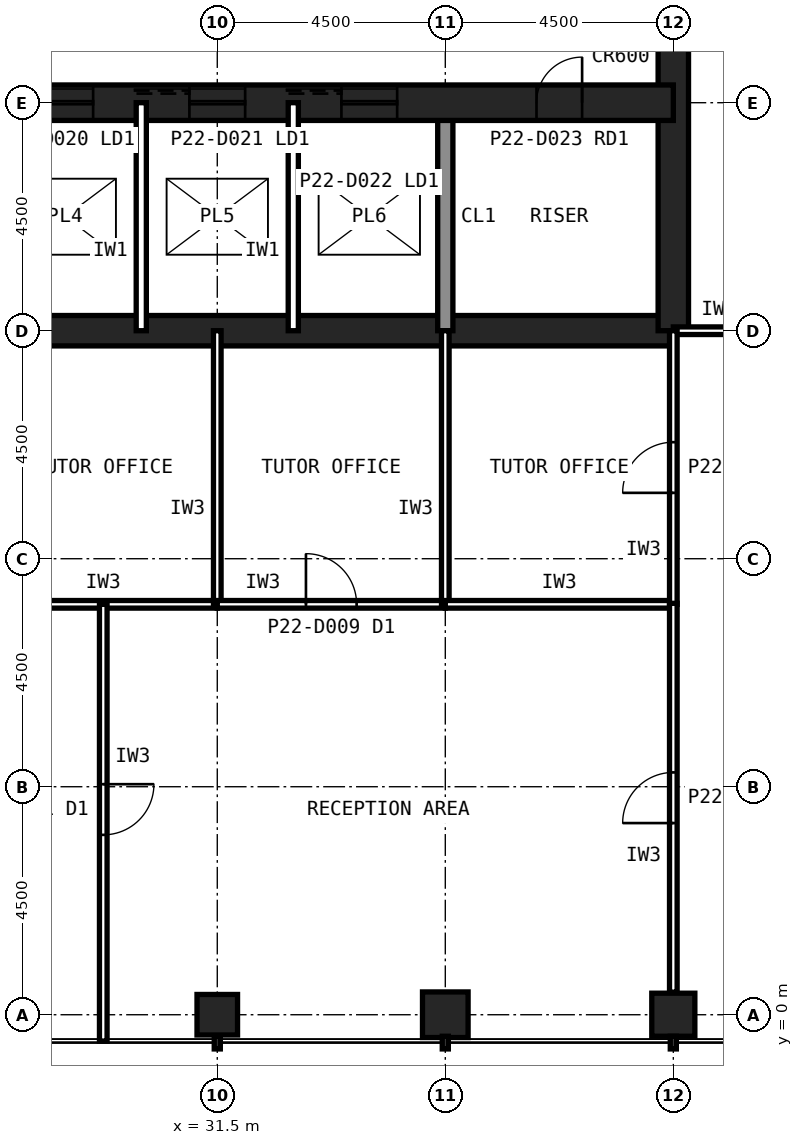
"""IFC4 building model, lengths in metres.
Left out: names, types, materials, properties, quantities, classifications, styles, units other than length and angle.
Written with IfcOpenShell. Run it as: python <this file> out.ifc"""

import sys

from ifc_helpers import new_model, si_unit, direction, frame, frame_2d, origin, origin_2d, place, context, subcontext, project, spatial, rectangle, hollow_rectangle, extrude, element, fill, save


model = new_model("IFC4")
c1 = context("Model", 3, precision=1e-05, world=origin(), true_north=direction((0.0, 1.0)))
c2 = subcontext(c1, "Body", "Model", "MODEL_VIEW")
j1 = project(units=[si_unit("LENGTHUNIT", "METRE"), si_unit("PLANEANGLEUNIT", "RADIAN")], contexts=[c1])
p1 = place(None, origin())
s1 = spatial("IfcSite", under=j1, at=p1, CompositionType="ELEMENT")
p2 = place(p1, origin())
s2 = spatial("IfcBuilding", under=s1, at=p2, CompositionType="ELEMENT")
p3 = place(p2, frame((0.0, 0.0, 96.2)))
s3 = spatial("IfcBuildingStorey", under=s2, at=p3, CompositionType="ELEMENT", Elevation=96.2)
p4 = place(p3, frame((31.5, 0.0, 0.0), z_axis=(0.0, 0.0, 1.0), x_axis=(1.0, 0.0, 0.0)))
e1 = element("IfcColumn", 1, at=p4, inside=s3, PredefinedType="COLUMN", context=c2, shape_type="SweptSolid", body=[
    extrude(hollow_rectangle(XDim=0.8, YDim=0.8, WallThickness=0.045, at=origin_2d()), origin(), (0.0, 0.0, 1.0), 4.2),
])
p5 = place(p3, frame((36.0, 0.0, 0.0), z_axis=(0.0, 0.0, 1.0), x_axis=(1.0, 0.0, 0.0)))
e2 = element("IfcColumn", 2, at=p5, inside=s3, PredefinedType="COLUMN", context=c2, shape_type="SweptSolid", body=[
    extrude(hollow_rectangle(XDim=0.9, YDim=0.9, WallThickness=0.063, at=origin_2d()), origin(), (0.0, 0.0, 1.0), 4.2),
])
p6 = place(p3, frame((40.5, 0.0, 0.0), z_axis=(0.0, 0.0, 1.0), x_axis=(1.0, 0.0, 0.0)))
e3 = element("IfcColumn", 3, at=p6, inside=s3, PredefinedType="COLUMN", context=c2, shape_type="SweptSolid", body=[
    extrude(hollow_rectangle(XDim=0.85, YDim=0.85, WallThickness=0.05, at=origin_2d()), origin(), (0.0, 0.0, 1.0), 4.2),
])
p7 = place(p3, frame((13.5, 13.5, 0.0), z_axis=(0.0, 0.0, 1.0), x_axis=(1.0, 0.0, 0.0)))
e4 = element("IfcWall", 4, at=p7, inside=s3, PredefinedType="SHEAR", context=c2, shape_type="SweptSolid", body=[
    extrude(rectangle(XDim=27.0, YDim=0.6, at=frame_2d((13.5, 0.0))), origin(), (0.0, 0.0, 1.0), 4.2),
])
p8 = place(p3, frame((40.5, 13.5, 0.0), z_axis=(0.0, 0.0, 1.0), x_axis=(0.0, 1.0, 0.0)))
e5 = element("IfcWall", 5, at=p8, inside=s3, PredefinedType="SHEAR", context=c2, shape_type="SweptSolid", body=[
    extrude(rectangle(XDim=27.0, YDim=0.6, at=frame_2d((13.5, 0.0))), origin(), (0.0, 0.0, 1.0), 4.2),
])
p9 = place(p8, frame((5.85, 0.0, 0.0)))
e6 = element("IfcOpeningElement", 6, at=p9, cuts=e5, PredefinedType="OPENING", context=c2, shape_type="SweptSolid", body=[
    extrude(rectangle(XDim=1.8, YDim=2.1, at=frame_2d((0.9, 1.05))), frame((0.0, 0.31, 0.0), z_axis=(0.0, -1.0, 0.0), x_axis=(1.0, 0.0, 0.0)), (0.0, 0.0, 1.0), 0.62),
])
p10 = place(p8, frame((19.65, 0.0, 0.0)))
e7 = element("IfcOpeningElement", 7, at=p10, cuts=e5, PredefinedType="OPENING", context=c2, shape_type="SweptSolid", body=[
    extrude(rectangle(XDim=1.2, YDim=2.1, at=frame_2d((0.6, 1.05))), frame((0.0, 0.31, 0.0), z_axis=(0.0, -1.0, 0.0), x_axis=(1.0, 0.0, 0.0)), (0.0, 0.0, 1.0), 0.62),
])
p11 = place(p3, frame((36.0, 13.5, 0.0), z_axis=(0.0, 0.0, 1.0), x_axis=(0.0, 1.0, 0.0)))
e8 = element("IfcWall", 8, at=p11, inside=s3, PredefinedType="SOLIDWALL", context=c2, shape_type="SweptSolid", body=[
    extrude(rectangle(XDim=4.5, YDim=0.3, at=frame_2d((2.25, 0.0))), origin(), (0.0, 0.0, 1.0), 4.04),
])
p12 = place(p3, frame((13.5, 18.0, 0.0), z_axis=(0.0, 0.0, 1.0), x_axis=(1.0, 0.0, 0.0)))
e9 = element("IfcWall", 9, at=p12, inside=s3, PredefinedType="SHEAR", context=c2, shape_type="SweptSolid", body=[
    extrude(rectangle(XDim=27.0, YDim=0.7, at=frame_2d((13.5, 0.0))), origin(), (0.0, 0.0, 1.0), 4.2),
])
p13 = place(p12, frame((24.3, 0.0, 0.0)))
e10 = element("IfcOpeningElement", 10, at=p13, cuts=e9, PredefinedType="OPENING", context=c2, shape_type="SweptSolid", body=[
    extrude(rectangle(XDim=0.9, YDim=2.1, at=frame_2d((0.45, 1.05))), frame((0.0, 0.36, 0.0), z_axis=(0.0, -1.0, 0.0), x_axis=(1.0, 0.0, 0.0)), (0.0, 0.0, 1.0), 0.72),
])
p14 = place(p12, frame((5.45, 0.0, 0.0)))
e11 = element("IfcOpeningElement", 11, at=p14, cuts=e9, PredefinedType="OPENING", context=c2, shape_type="SweptSolid", body=[
    extrude(rectangle(XDim=1.1, YDim=2.1, at=frame_2d((0.55, 1.05))), frame((0.0, 0.36, 0.0), z_axis=(0.0, -1.0, 0.0), x_axis=(1.0, 0.0, 0.0)), (0.0, 0.0, 1.0), 0.72),
])
p15 = place(p12, frame((8.45, 0.0, 0.0)))
e12 = element("IfcOpeningElement", 12, at=p15, cuts=e9, PredefinedType="OPENING", context=c2, shape_type="SweptSolid", body=[
    extrude(rectangle(XDim=1.1, YDim=2.1, at=frame_2d((0.55, 1.05))), frame((0.0, 0.36, 0.0), z_axis=(0.0, -1.0, 0.0), x_axis=(1.0, 0.0, 0.0)), (0.0, 0.0, 1.0), 0.72),
])
p16 = place(p12, frame((11.45, 0.0, 0.0)))
e13 = element("IfcOpeningElement", 13, at=p16, cuts=e9, PredefinedType="OPENING", context=c2, shape_type="SweptSolid", body=[
    extrude(rectangle(XDim=1.1, YDim=2.1, at=frame_2d((0.55, 1.05))), frame((0.0, 0.36, 0.0), z_axis=(0.0, -1.0, 0.0), x_axis=(1.0, 0.0, 0.0)), (0.0, 0.0, 1.0), 0.72),
])
p17 = place(p12, frame((14.45, 0.0, 0.0)))
e14 = element("IfcOpeningElement", 14, at=p17, cuts=e9, PredefinedType="OPENING", context=c2, shape_type="SweptSolid", body=[
    extrude(rectangle(XDim=1.1, YDim=2.1, at=frame_2d((0.55, 1.05))), frame((0.0, 0.36, 0.0), z_axis=(0.0, -1.0, 0.0), x_axis=(1.0, 0.0, 0.0)), (0.0, 0.0, 1.0), 0.72),
])
p18 = place(p12, frame((17.45, 0.0, 0.0)))
e15 = element("IfcOpeningElement", 15, at=p18, cuts=e9, PredefinedType="OPENING", context=c2, shape_type="SweptSolid", body=[
    extrude(rectangle(XDim=1.1, YDim=2.1, at=frame_2d((0.55, 1.05))), frame((0.0, 0.36, 0.0), z_axis=(0.0, -1.0, 0.0), x_axis=(1.0, 0.0, 0.0)), (0.0, 0.0, 1.0), 0.72),
])
p19 = place(p12, frame((20.45, 0.0, 0.0)))
e16 = element("IfcOpeningElement", 16, at=p19, cuts=e9, PredefinedType="OPENING", context=c2, shape_type="SweptSolid", body=[
    extrude(rectangle(XDim=1.1, YDim=2.1, at=frame_2d((0.55, 1.05))), frame((0.0, 0.36, 0.0), z_axis=(0.0, -1.0, 0.0), x_axis=(1.0, 0.0, 0.0)), (0.0, 0.0, 1.0), 0.72),
])
p20 = place(p12, frame((1.6, 0.0, 0.0)))
e17 = element("IfcOpeningElement", 17, at=p20, cuts=e9, PredefinedType="OPENING", context=c2, shape_type="SweptSolid", body=[
    extrude(rectangle(XDim=1.3, YDim=2.2, at=frame_2d((0.65, 1.1))), frame((0.0, 0.36, 0.0), z_axis=(0.0, -1.0, 0.0), x_axis=(1.0, 0.0, 0.0)), (0.0, 0.0, 1.0), 0.72),
])
for number, where, z_axis, x_axis in (
    (18, (30.0, 13.5, 0.0), (0.0, 0.0, 1.0), (0.0, 1.0, 0.0)),
    (19, (33.0, 13.5, 0.0), (0.0, 0.0, 1.0), (0.0, 1.0, 0.0)),
):
    element("IfcWall", number, at=place(p3, frame(where, z_axis=z_axis, x_axis=x_axis)), inside=s3, PredefinedType="PARTITIONING", context=c2, shape_type="SweptSolid", body=[
        extrude(rectangle(XDim=4.5, YDim=0.2, at=frame_2d((2.25, 0.0))), origin(), (0.0, 0.0, 1.0), 4.04),
    ])
p21 = place(p3, frame((40.5, 13.5, 0.0), z_axis=(0.0, 0.0, 1.0), x_axis=(1.0, 0.0, 0.0)))
e20 = element("IfcWall", 20, at=p21, inside=s3, PredefinedType="PARTITIONING", context=c2, shape_type="SweptSolid", body=[
    extrude(rectangle(XDim=1.8, YDim=0.15, at=frame_2d((0.9, 0.0))), origin(), (0.0, 0.0, 1.0), 3.189),
])
p22 = place(p3, frame((27.0, 8.1, 0.0), z_axis=(0.0, 0.0, 1.0), x_axis=(1.0, 0.0, 0.0)))
e21 = element("IfcWall", 21, at=p22, inside=s3, PredefinedType="PARTITIONING", context=c2, shape_type="SweptSolid", body=[
    extrude(rectangle(XDim=4.5, YDim=0.15, at=frame_2d((2.25, 0.0))), origin(), (0.0, 0.0, 1.0), 4.04),
])
p23 = place(p3, frame((31.5, 8.1, 0.0), z_axis=(0.0, 0.0, 1.0), x_axis=(0.0, 1.0, 0.0)))
e22 = element("IfcWall", 22, at=p23, inside=s3, PredefinedType="PARTITIONING", context=c2, shape_type="SweptSolid", body=[
    extrude(rectangle(XDim=5.4, YDim=0.15, at=frame_2d((2.7, 0.0))), origin(), (0.0, 0.0, 1.0), 3.189),
])
p24 = place(p3, frame((31.5, 8.1, 0.0), z_axis=(0.0, 0.0, 1.0), x_axis=(1.0, 0.0, 0.0)))
e23 = element("IfcWall", 23, at=p24, inside=s3, PredefinedType="PARTITIONING", context=c2, shape_type="SweptSolid", body=[
    extrude(rectangle(XDim=4.5, YDim=0.15, at=frame_2d((2.25, 0.0))), origin(), (0.0, 0.0, 1.0), 4.04),
])
p25 = place(p24, frame((1.75, 0.0, 0.0)))
e24 = element("IfcOpeningElement", 24, at=p25, cuts=e23, PredefinedType="OPENING", context=c2, shape_type="SweptSolid", body=[
    extrude(rectangle(XDim=1.0, YDim=2.1, at=frame_2d((0.5, 1.05))), frame((0.0, 0.085, 0.0), z_axis=(0.0, -1.0, 0.0), x_axis=(1.0, 0.0, 0.0)), (0.0, 0.0, 1.0), 0.17),
])
p26 = place(p3, frame((36.0, 8.1, 0.0), z_axis=(0.0, 0.0, 1.0), x_axis=(0.0, 1.0, 0.0)))
e25 = element("IfcWall", 25, at=p26, inside=s3, PredefinedType="PARTITIONING", context=c2, shape_type="SweptSolid", body=[
    extrude(rectangle(XDim=5.4, YDim=0.15, at=frame_2d((2.7, 0.0))), origin(), (0.0, 0.0, 1.0), 3.189),
])
p27 = place(p3, frame((36.0, 8.1, 0.0), z_axis=(0.0, 0.0, 1.0), x_axis=(1.0, 0.0, 0.0)))
e26 = element("IfcWall", 26, at=p27, inside=s3, PredefinedType="PARTITIONING", context=c2, shape_type="SweptSolid", body=[
    extrude(rectangle(XDim=4.5, YDim=0.15, at=frame_2d((2.25, 0.0))), origin(), (0.0, 0.0, 1.0), 4.04),
])
p28 = place(p3, frame((40.5, 8.1, 0.0), z_axis=(0.0, 0.0, 1.0), x_axis=(0.0, 1.0, 0.0)))
e27 = element("IfcWall", 27, at=p28, inside=s3, PredefinedType="PARTITIONING", context=c2, shape_type="SweptSolid", body=[
    extrude(rectangle(XDim=5.4, YDim=0.15, at=frame_2d((2.7, 0.0))), origin(), (0.0, 0.0, 1.0), 3.189),
])
p29 = place(p28, frame((2.2, 0.0, 0.0)))
e28 = element("IfcOpeningElement", 28, at=p29, cuts=e27, PredefinedType="OPENING", context=c2, shape_type="SweptSolid", body=[
    extrude(rectangle(XDim=1.0, YDim=2.1, at=frame_2d((0.5, 1.05))), frame((0.0, 0.085, 0.0), z_axis=(0.0, -1.0, 0.0), x_axis=(1.0, 0.0, 0.0)), (0.0, 0.0, 1.0), 0.17),
])
p30 = place(p3, frame((29.25, 8.1, 0.0), z_axis=(0.0, 0.0, 1.0), x_axis=(0.0, -1.0, 0.0)))
e29 = element("IfcWall", 29, at=p30, inside=s3, PredefinedType="PARTITIONING", context=c2, shape_type="SweptSolid", body=[
    extrude(rectangle(XDim=8.62, YDim=0.15, at=frame_2d((4.31, 0.0))), origin(), (0.0, 0.0, 1.0), 4.04),
])
p31 = place(p30, frame((3.55, 0.0, 0.0)))
e30 = element("IfcOpeningElement", 30, at=p31, cuts=e29, PredefinedType="OPENING", context=c2, shape_type="SweptSolid", body=[
    extrude(rectangle(XDim=1.0, YDim=2.1, at=frame_2d((0.5, 1.05))), frame((0.0, 0.085, 0.0), z_axis=(0.0, -1.0, 0.0), x_axis=(1.0, 0.0, 0.0)), (0.0, 0.0, 1.0), 0.17),
])
p32 = place(p3, frame((40.5, 0.445, 0.0), z_axis=(0.0, 0.0, 1.0), x_axis=(0.0, 1.0, 0.0)))
e31 = element("IfcWall", 31, at=p32, inside=s3, PredefinedType="PARTITIONING", context=c2, shape_type="SweptSolid", body=[
    extrude(rectangle(XDim=7.675, YDim=0.15, at=frame_2d((3.837, 0.0))), origin(), (0.0, 0.0, 1.0), 3.189),
])
p33 = place(p32, frame((3.337, 0.0, 0.0)))
e32 = element("IfcOpeningElement", 32, at=p33, cuts=e31, PredefinedType="OPENING", context=c2, shape_type="SweptSolid", body=[
    extrude(rectangle(XDim=1.0, YDim=2.1, at=frame_2d((0.5, 1.05))), frame((0.0, 0.085, 0.0), z_axis=(0.0, -1.0, 0.0), x_axis=(1.0, 0.0, 0.0)), (0.0, 0.0, 1.0), 0.17),
])
p34 = place(p13, origin())
e33 = element("IfcDoor", 33, at=p34, inside=s3, OperationType="SINGLE_SWING_RIGHT", PredefinedType="DOOR", context=c2, shape_type="SweptSolid", body=[
    extrude(rectangle(XDim=0.9, YDim=2.1, at=frame_2d((0.45, 1.05))), frame((0.0, 0.025, 0.0), z_axis=(0.0, -1.0, 0.0), x_axis=(1.0, 0.0, 0.0)), (0.0, 0.0, 1.0), 0.05),
])
fill(e10, e33)
p35 = place(p17, origin())
e34 = element("IfcDoor", 34, at=p35, inside=s3, OperationType="SLIDING_TO_LEFT", PredefinedType="DOOR", context=c2, shape_type="SweptSolid", body=[
    extrude(rectangle(XDim=1.1, YDim=2.1, at=frame_2d((0.55, 1.05))), frame((0.0, 0.025, 0.0), z_axis=(0.0, -1.0, 0.0), x_axis=(1.0, 0.0, 0.0)), (0.0, 0.0, 1.0), 0.05),
])
fill(e14, e34)
p36 = place(p18, origin())
e35 = element("IfcDoor", 35, at=p36, inside=s3, OperationType="SLIDING_TO_LEFT", PredefinedType="DOOR", context=c2, shape_type="SweptSolid", body=[
    extrude(rectangle(XDim=1.1, YDim=2.1, at=frame_2d((0.55, 1.05))), frame((0.0, 0.025, 0.0), z_axis=(0.0, -1.0, 0.0), x_axis=(1.0, 0.0, 0.0)), (0.0, 0.0, 1.0), 0.05),
])
fill(e15, e35)
p37 = place(p19, origin())
e36 = element("IfcDoor", 36, at=p37, inside=s3, OperationType="SLIDING_TO_LEFT", PredefinedType="DOOR", context=c2, shape_type="SweptSolid", body=[
    extrude(rectangle(XDim=1.1, YDim=2.1, at=frame_2d((0.55, 1.05))), frame((0.0, 0.025, 0.0), z_axis=(0.0, -1.0, 0.0), x_axis=(1.0, 0.0, 0.0)), (0.0, 0.0, 1.0), 0.05),
])
fill(e16, e36)
p38 = place(p25, origin())
e37 = element("IfcDoor", 37, at=p38, inside=s3, OperationType="SINGLE_SWING_LEFT", PredefinedType="DOOR", context=c2, shape_type="SweptSolid", body=[
    extrude(rectangle(XDim=1.0, YDim=2.1, at=frame_2d((0.5, 1.05))), frame((0.0, 0.025, 0.0), z_axis=(0.0, -1.0, 0.0), x_axis=(1.0, 0.0, 0.0)), (0.0, 0.0, 1.0), 0.05),
])
fill(e24, e37)
p39 = place(p29, origin())
e38 = element("IfcDoor", 38, at=p39, inside=s3, OperationType="SINGLE_SWING_LEFT", PredefinedType="DOOR", context=c2, shape_type="SweptSolid", body=[
    extrude(rectangle(XDim=1.0, YDim=2.1, at=frame_2d((0.5, 1.05))), frame((0.0, 0.025, 0.0), z_axis=(0.0, -1.0, 0.0), x_axis=(1.0, 0.0, 0.0)), (0.0, 0.0, 1.0), 0.05),
])
fill(e28, e38)
p40 = place(p31, origin())
e39 = element("IfcDoor", 39, at=p40, inside=s3, OperationType="SINGLE_SWING_LEFT", PredefinedType="DOOR", context=c2, shape_type="SweptSolid", body=[
    extrude(rectangle(XDim=1.0, YDim=2.1, at=frame_2d((0.5, 1.05))), frame((0.0, 0.025, 0.0), z_axis=(0.0, -1.0, 0.0), x_axis=(1.0, 0.0, 0.0)), (0.0, 0.0, 1.0), 0.05),
])
fill(e30, e39)
p41 = place(p33, origin())
e40 = element("IfcDoor", 40, at=p41, inside=s3, OperationType="SINGLE_SWING_LEFT", PredefinedType="DOOR", context=c2, shape_type="SweptSolid", body=[
    extrude(rectangle(XDim=1.0, YDim=2.1, at=frame_2d((0.5, 1.05))), frame((0.0, 0.025, 0.0), z_axis=(0.0, -1.0, 0.0), x_axis=(1.0, 0.0, 0.0)), (0.0, 0.0, 1.0), 0.05),
])
fill(e32, e40)
save(model, sys.argv[1])
